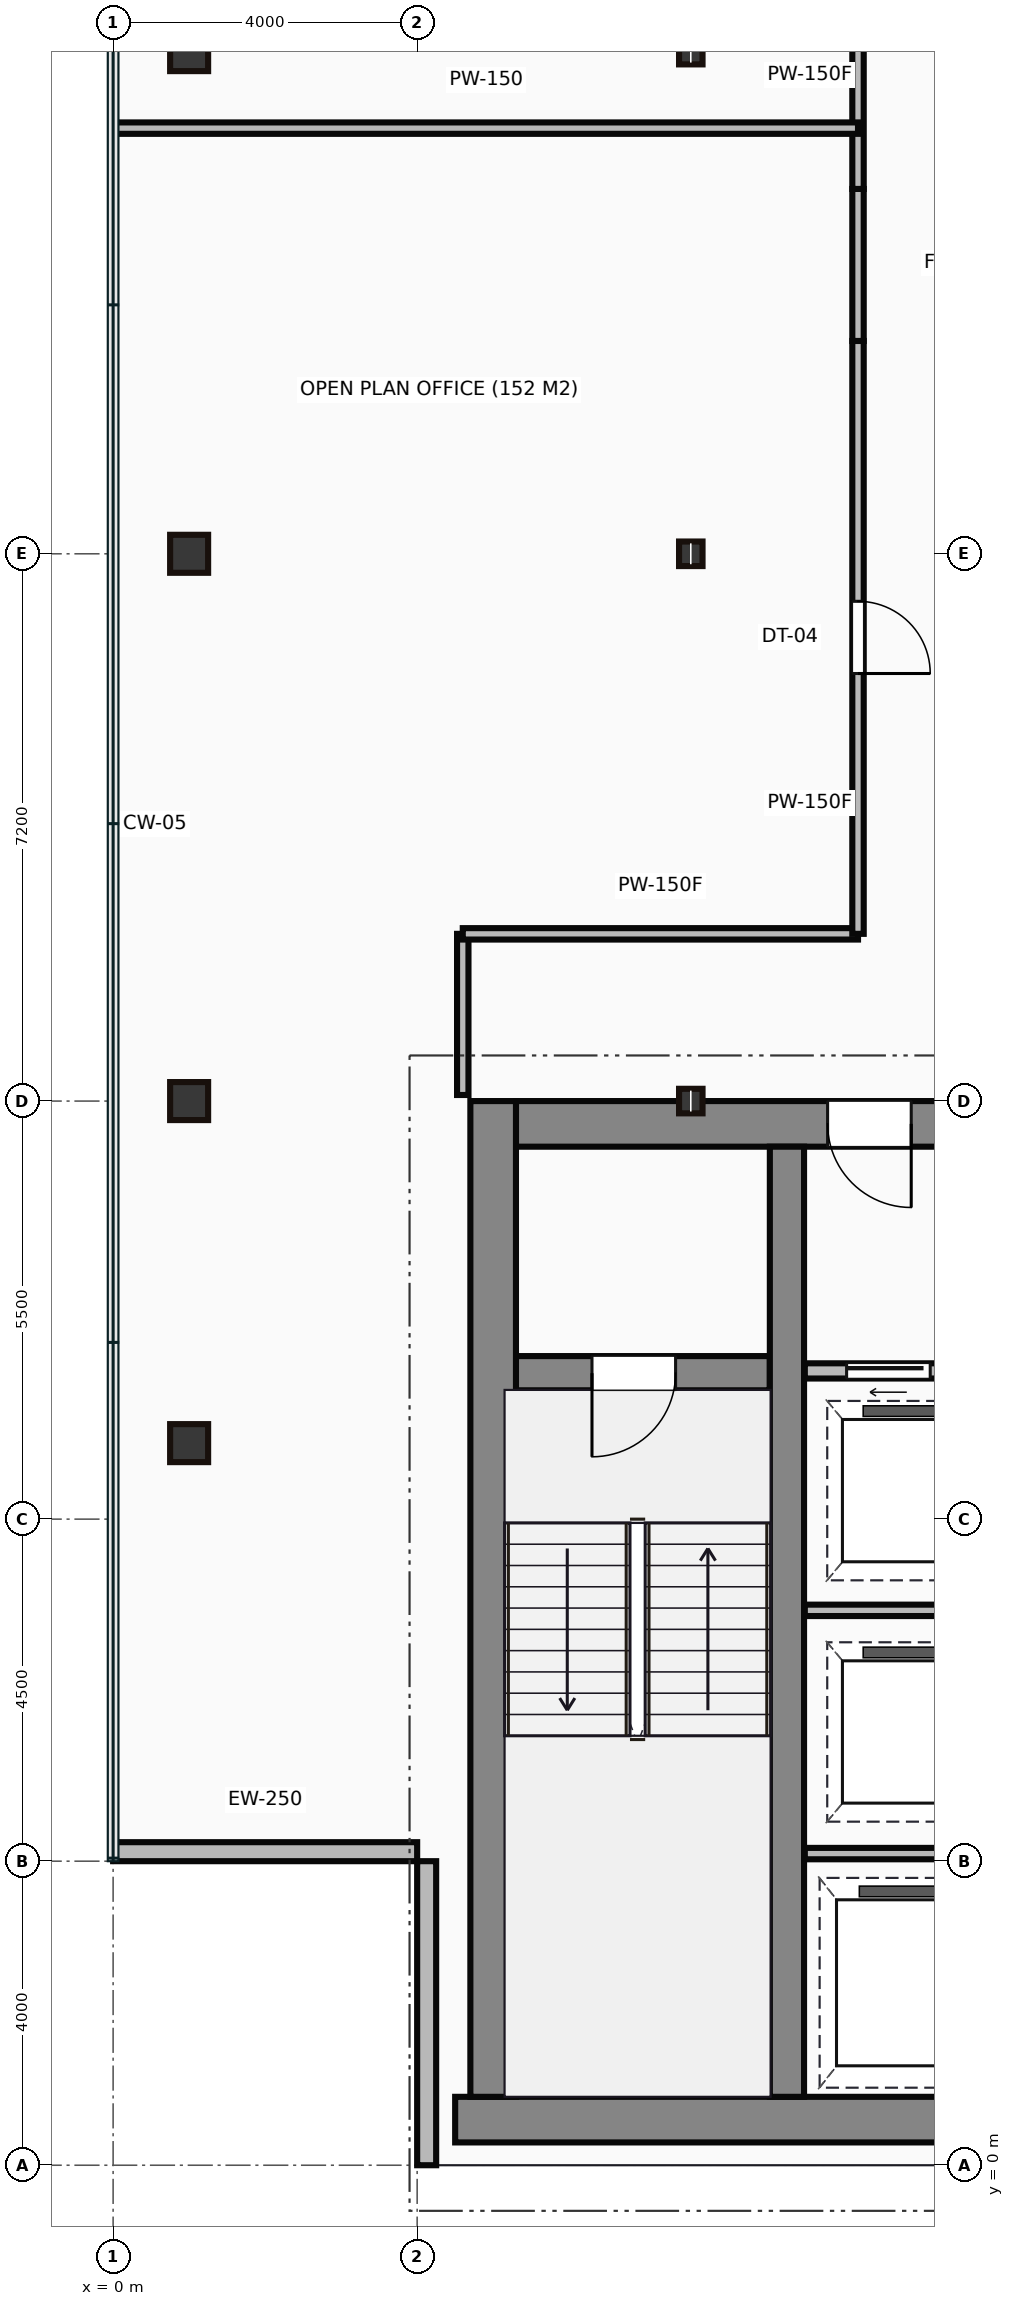
"""IFC4 building model, lengths in metres.
Left out: names, types, materials, properties, quantities, classifications, styles, units other than length and angle.
Written with IfcOpenShell. Run it as: python <this file> out.ifc"""

import sys

from ifc_helpers import new_model, si_unit, direction, frame, frame_2d, origin, origin_2d, place, context, subcontext, project, spatial, rectangle, hollow_rectangle, i_section, extrude, source, transform, mapped, element, fill, save


model = new_model("IFC4")
c1 = context("Model", 3, precision=1e-05, world=origin(), true_north=direction((0.0, 1.0)))
c2 = subcontext(c1, "Body", "Model", "MODEL_VIEW")
j1 = project(units=[si_unit("LENGTHUNIT", "METRE"), si_unit("PLANEANGLEUNIT", "RADIAN")], contexts=[c1])
p1 = place(None, origin())
s1 = spatial("IfcSite", under=j1, at=p1, CompositionType="ELEMENT")
p2 = place(p1, origin())
s2 = spatial("IfcBuilding", under=s1, at=p2, CompositionType="ELEMENT")
p3 = place(p2, frame((0.0, 0.0, 244.2)))
s3 = spatial("IfcBuildingStorey", under=s2, at=p3, CompositionType="ELEMENT", Elevation=244.2)
m1 = source(origin(), c2, "Body", "SweptSolid", [
    extrude(rectangle(XDim=29.5, YDim=0.6, at=frame_2d((14.75, 0.0))), origin(), (0.0, 0.0, 1.0), 3.65),
])
p4 = place(p3, frame((4.5, 0.6, 0.0), z_axis=(0.0, 0.0, 1.0), x_axis=(1.0, 0.0, 0.0)))
e1 = element("IfcWall", 1, at=p4, inside=s3, PredefinedType="SHEAR", context=c2, shape_type="MappedRepresentation", body=[
    mapped(m1, transform((0.0, 0.0, 0.0))),
])
m2 = source(origin(), c2, "Body", "SweptSolid", [
    extrude(rectangle(XDim=13.1, YDim=0.6, at=frame_2d((6.55, 0.0))), origin(), (0.0, 0.0, 1.0), 3.65),
])
p5 = place(p3, frame((5.0, 0.9, 0.0), z_axis=(0.0, 0.0, 1.0), x_axis=(0.0, 1.0, 0.0)))
e2 = element("IfcWall", 2, at=p5, inside=s3, PredefinedType="SHEAR", context=c2, shape_type="MappedRepresentation", body=[
    mapped(m2, transform((0.0, 0.0, 0.0))),
])
m3 = source(origin(), c2, "Body", "SweptSolid", [
    extrude(rectangle(XDim=9.1, YDim=0.6, at=frame_2d((4.55, 0.0))), origin(), (0.0, 0.0, 1.0), 3.65),
])
p6 = place(p3, frame((5.3, 13.7, 0.0), z_axis=(0.0, 0.0, 1.0), x_axis=(1.0, 0.0, 0.0)))
e3 = element("IfcWall", 3, at=p6, inside=s3, PredefinedType="SHEAR", context=c2, shape_type="MappedRepresentation", body=[
    mapped(m3, transform((0.0, 0.0, 0.0))),
])
p7 = place(p6, frame((4.1, 0.0, 0.0)))
e4 = element("IfcOpeningElement", 4, at=p7, cuts=e3, PredefinedType="OPENING", context=c2, shape_type="SweptSolid", body=[
    extrude(rectangle(XDim=1.1, YDim=2.15, at=frame_2d((0.55, 1.075))), frame((0.0, 0.31, 0.0), z_axis=(0.0, -1.0, 0.0), x_axis=(1.0, 0.0, 0.0)), (0.0, 0.0, 1.0), 0.62),
])
m4 = source(origin(), c2, "Body", "SweptSolid", [
    extrude(rectangle(XDim=12.5, YDim=0.45, at=frame_2d((6.25, 0.0))), origin(), (0.0, 0.0, 1.0), 3.65),
])
p8 = place(p3, frame((8.865, 0.9, 0.0), z_axis=(0.0, 0.0, 1.0), x_axis=(0.0, 1.0, 0.0)))
e5 = element("IfcWall", 5, at=p8, inside=s3, PredefinedType="SHEAR", context=c2, shape_type="MappedRepresentation", body=[
    mapped(m4, transform((0.0, 0.0, 0.0))),
])
m5 = source(origin(), c2, "Body", "SweptSolid", [
    extrude(rectangle(XDim=3.39, YDim=0.45, at=frame_2d((1.695, 0.0))), origin(), (0.0, 0.0, 1.0), 3.65),
])
p9 = place(p3, frame((5.25, 10.42, 0.0), z_axis=(0.0, 0.0, 1.0), x_axis=(1.0, 0.0, 0.0)))
e6 = element("IfcWall", 6, at=p9, inside=s3, PredefinedType="SHEAR", context=c2, shape_type="MappedRepresentation", body=[
    mapped(m5, transform((0.0, 0.0, 0.0))),
])
p10 = place(p9, frame((1.05, 0.0, 0.0)))
e7 = element("IfcOpeningElement", 7, at=p10, cuts=e6, PredefinedType="OPENING", context=c2, shape_type="SweptSolid", body=[
    extrude(rectangle(XDim=1.1, YDim=2.15, at=frame_2d((0.55, 1.075))), frame((0.0, 0.235, 0.0), z_axis=(0.0, -1.0, 0.0), x_axis=(1.0, 0.0, 0.0)), (0.0, 0.0, 1.0), 0.47),
])
m6 = source(origin(), c2, "Body", "SweptSolid", [
    extrude(hollow_rectangle(XDim=0.5, YDim=0.5, WallThickness=0.022, at=origin_2d()), origin(), (0.0, 0.0, 1.0), 3.65),
])
for number, where, z_axis, x_axis in (
    (8, (1.0, 9.5, 0.0), (0.0, 0.0, 1.0), (1.0, 0.0, 0.0)),
    (9, (1.0, 14.0, 0.0), (0.0, 0.0, 1.0), (1.0, 0.0, 0.0)),
    (10, (1.0, 21.2, 0.0), (0.0, 0.0, 1.0), (1.0, 0.0, 0.0)),
    (11, (1.0, 27.8, 0.0), (0.0, 0.0, 1.0), (1.0, 0.0, 0.0)),
):
    element("IfcColumn", number, at=place(p3, frame(where, z_axis=z_axis, x_axis=x_axis)), inside=s3, PredefinedType="COLUMN", context=c2, shape_type="MappedRepresentation", body=[
        mapped(m6, transform((0.0, 0.0, 0.0))),
    ])
m7 = source(origin(), c2, "Body", "SweptSolid", [
    extrude(i_section(OverallWidth=0.309, OverallDepth=0.323, WebThickness=0.014, FlangeThickness=0.023, at=origin_2d()), origin(), (0.0, 0.0, 1.0), 3.65),
])
for number, where, z_axis, x_axis in (
    (12, (7.6, 14.0, 0.0), (0.0, 0.0, 1.0), (1.0, 0.0, 0.0)),
    (13, (7.6, 21.2, 0.0), (0.0, 0.0, 1.0), (1.0, 0.0, 0.0)),
    (14, (7.6, 27.8, 0.0), (0.0, 0.0, 1.0), (1.0, 0.0, 0.0)),
):
    element("IfcColumn", number, at=place(p3, frame(where, z_axis=z_axis, x_axis=x_axis)), inside=s3, PredefinedType="COLUMN", context=c2, shape_type="MappedRepresentation", body=[
        mapped(m7, transform((0.0, 0.0, 0.0))),
    ])
m8 = source(origin(), c2, "Body", "SweptSolid", [
    extrude(rectangle(XDim=4.0, YDim=0.25, at=frame_2d((2.0, 0.0))), origin(), (0.0, 0.0, 1.0), 3.4),
])
for number, where, z_axis, x_axis in (
    (15, (0.0, 4.125, 0.0), (0.0, 0.0, 1.0), (1.0, 0.0, 0.0)),
    (16, (4.125, 4.0, 0.0), (0.0, 0.0, 1.0), (0.0, -1.0, 0.0)),
):
    element("IfcWall", number, at=place(p3, frame(where, z_axis=z_axis, x_axis=x_axis)), inside=s3, PredefinedType="STANDARD", context=c2, shape_type="MappedRepresentation", body=[
        mapped(m8, transform((0.0, 0.0, 0.0))),
    ])
m9 = source(origin(), c2, "Body", "SweptSolid", [
    extrude(rectangle(XDim=2.35, YDim=0.2, at=frame_2d((1.175, 0.0))), origin(), (0.0, 0.0, 1.0), 3.4),
])
p11 = place(p3, frame((9.1, 10.45, 0.0), z_axis=(0.0, 0.0, 1.0), x_axis=(1.0, 0.0, 0.0)))
e17 = element("IfcWall", 17, at=p11, inside=s3, PredefinedType="PARTITIONING", context=c2, shape_type="MappedRepresentation", body=[
    mapped(m9, transform((0.0, 0.0, 0.0))),
])
p12 = place(p11, frame((0.55, 0.0, 0.0)))
e18 = element("IfcOpeningElement", 18, at=p12, cuts=e17, PredefinedType="OPENING", context=c2, shape_type="SweptSolid", body=[
    extrude(rectangle(XDim=1.1, YDim=2.15, at=frame_2d((0.55, 1.075))), frame((0.0, 0.11, 0.0), z_axis=(0.0, -1.0, 0.0), x_axis=(1.0, 0.0, 0.0)), (0.0, 0.0, 1.0), 0.22),
])
m10 = source(origin(), c2, "Body", "SweptSolid", [
    extrude(rectangle(XDim=2.4, YDim=0.15, at=frame_2d((1.2, 0.0))), origin(), (0.0, 0.0, 1.0), 3.4),
])
for number, where, z_axis, x_axis in (
    (19, (9.1, 4.1, 0.0), (0.0, 0.0, 1.0), (1.0, 0.0, 0.0)),
    (20, (9.1, 7.3, 0.0), (0.0, 0.0, 1.0), (1.0, 0.0, 0.0)),
):
    element("IfcWall", number, at=place(p3, frame(where, z_axis=z_axis, x_axis=x_axis)), inside=s3, PredefinedType="PARTITIONING", context=c2, shape_type="MappedRepresentation", body=[
        mapped(m10, transform((0.0, 0.0, 0.0))),
    ])
m11 = source(origin(), c2, "Body", "SweptSolid", [
    extrude(rectangle(XDim=2.12, YDim=0.15, at=frame_2d((1.06, 0.0))), origin(), (0.0, 0.0, 1.0), 3.4),
])
p13 = place(p3, frame((4.6, 14.08, 0.0), z_axis=(0.0, 0.0, 1.0), x_axis=(0.0, 1.0, 0.0)))
e21 = element("IfcWall", 21, at=p13, inside=s3, PredefinedType="PARTITIONING", context=c2, shape_type="MappedRepresentation", body=[
    mapped(m11, transform((0.0, 0.0, 0.0))),
])
m12 = source(origin(), c2, "Body", "SweptSolid", [
    extrude(rectangle(XDim=5.2, YDim=0.15, at=frame_2d((2.6, 0.0))), origin(), (0.0, 0.0, 1.0), 3.4),
])
p14 = place(p3, frame((4.6, 16.2, 0.0), z_axis=(0.0, 0.0, 1.0), x_axis=(1.0, 0.0, 0.0)))
e22 = element("IfcWall", 22, at=p14, inside=s3, PredefinedType="PARTITIONING", context=c2, shape_type="MappedRepresentation", body=[
    mapped(m12, transform((0.0, 0.0, 0.0))),
])
m13 = source(origin(), c2, "Body", "SweptSolid", [
    extrude(rectangle(XDim=7.8, YDim=0.15, at=frame_2d((3.9, 0.0))), origin(), (0.0, 0.0, 1.0), 3.4),
])
p15 = place(p3, frame((9.8, 16.2, 0.0), z_axis=(0.0, 0.0, 1.0), x_axis=(0.0, 1.0, 0.0)))
e23 = element("IfcWall", 23, at=p15, inside=s3, PredefinedType="PARTITIONING", context=c2, shape_type="MappedRepresentation", body=[
    mapped(m13, transform((0.0, 0.0, 0.0))),
])
p16 = place(p15, frame((3.425, 0.0, 0.0)))
e24 = element("IfcOpeningElement", 24, at=p16, cuts=e23, PredefinedType="OPENING", context=c2, shape_type="SweptSolid", body=[
    extrude(rectangle(XDim=0.95, YDim=2.15, at=frame_2d((0.475, 1.075))), frame((0.0, 0.085, 0.0), z_axis=(0.0, -1.0, 0.0), x_axis=(1.0, 0.0, 0.0)), (0.0, 0.0, 1.0), 0.17),
])
m14 = source(origin(), c2, "Body", "SweptSolid", [
    extrude(rectangle(XDim=2.0, YDim=0.15, at=frame_2d((1.0, 0.0))), origin(), (0.0, 0.0, 1.0), 3.4),
])
p17 = place(p3, frame((9.8, 24.0, 0.0), z_axis=(0.0, 0.0, 1.0), x_axis=(0.0, 1.0, 0.0)))
e25 = element("IfcWall", 25, at=p17, inside=s3, PredefinedType="PARTITIONING", context=c2, shape_type="MappedRepresentation", body=[
    mapped(m14, transform((0.0, 0.0, 0.0))),
])
m15 = source(origin(), c2, "Body", "SweptSolid", [
    extrude(rectangle(XDim=6.8, YDim=0.15, at=frame_2d((3.4, 0.0))), origin(), (0.0, 0.0, 1.0), 3.4),
])
p18 = place(p3, frame((9.8, 26.0, 0.0), z_axis=(0.0, 0.0, 1.0), x_axis=(0.0, 1.0, 0.0)))
e26 = element("IfcWall", 26, at=p18, inside=s3, PredefinedType="PARTITIONING", context=c2, shape_type="MappedRepresentation", body=[
    mapped(m15, transform((0.0, 0.0, 0.0))),
])
p19 = place(p18, frame((3.195, 0.0, 0.0)))
e27 = element("IfcOpeningElement", 27, at=p19, cuts=e26, PredefinedType="OPENING", context=c2, shape_type="SweptSolid", body=[
    extrude(rectangle(XDim=0.95, YDim=2.15, at=frame_2d((0.475, 1.075))), frame((0.0, 0.085, 0.0), z_axis=(0.0, -1.0, 0.0), x_axis=(1.0, 0.0, 0.0)), (0.0, 0.0, 1.0), 0.17),
])
m16 = source(origin(), c2, "Body", "SweptSolid", [
    extrude(rectangle(XDim=9.78, YDim=0.15, at=frame_2d((4.89, 0.0))), origin(), (0.0, 0.0, 1.0), 3.4),
])
p20 = place(p3, frame((0.02, 26.8, 0.0), z_axis=(0.0, 0.0, 1.0), x_axis=(1.0, 0.0, 0.0)))
e28 = element("IfcWall", 28, at=p20, inside=s3, PredefinedType="PARTITIONING", context=c2, shape_type="MappedRepresentation", body=[
    mapped(m16, transform((0.0, 0.0, 0.0))),
])
m17 = source(origin(), c2, "Body", "SweptSolid", [
    extrude(rectangle(XDim=1.1, YDim=2.15, at=frame_2d((0.55, 1.075))), frame((0.0, 0.025, 0.0), z_axis=(0.0, -1.0, 0.0), x_axis=(1.0, 0.0, 0.0)), (0.0, 0.0, 1.0), 0.05),
])
p21 = place(p10, frame((1.1, 0.0, 0.0), z_axis=(0.0, 0.0, 1.0), x_axis=(-1.0, 0.0, 0.0)))
e29 = element("IfcDoor", 29, at=p21, inside=s3, OperationType="SINGLE_SWING_LEFT", PredefinedType="DOOR", context=c2, shape_type="MappedRepresentation", body=[
    mapped(m17, transform((0.0, 0.0, 0.0))),
])
fill(e7, e29)
p22 = place(p7, origin())
e30 = element("IfcDoor", 30, at=p22, inside=s3, OperationType="SINGLE_SWING_RIGHT", PredefinedType="DOOR", context=c2, shape_type="MappedRepresentation", body=[
    mapped(m17, transform((0.0, 0.0, 0.0))),
])
fill(e4, e30)
p23 = place(p12, origin())
e31 = element("IfcDoor", 31, at=p23, inside=s3, OperationType="SLIDING_TO_LEFT", PredefinedType="DOOR", context=c2, shape_type="MappedRepresentation", body=[
    mapped(m17, transform((0.0, 0.0, 0.0))),
])
fill(e18, e31)
m18 = source(origin(), c2, "Body", "SweptSolid", [
    extrude(rectangle(XDim=0.95, YDim=2.15, at=frame_2d((0.475, 1.075))), frame((0.0, 0.025, 0.0), z_axis=(0.0, -1.0, 0.0), x_axis=(1.0, 0.0, 0.0)), (0.0, 0.0, 1.0), 0.05),
])
p24 = place(p16, origin())
e32 = element("IfcDoor", 32, at=p24, inside=s3, OperationType="SINGLE_SWING_LEFT", PredefinedType="DOOR", context=c2, shape_type="MappedRepresentation", body=[
    mapped(m18, transform((0.0, 0.0, 0.0))),
])
fill(e24, e32)
save(model, sys.argv[1])
